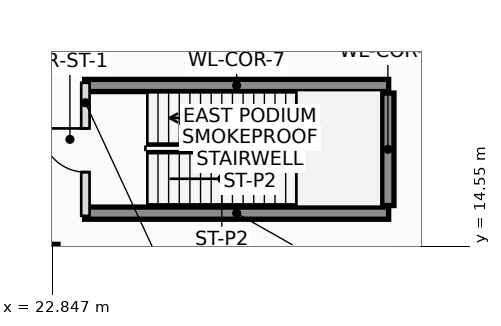
"""IFC4 building model, lengths in metres.
Left out: names, types, materials, properties, quantities, classifications, styles, units other than length and angle.
Written with IfcOpenShell. Run it as: python <this file> out.ifc"""

import sys

from ifc_helpers import new_model, si_unit, direction, frame, frame_2d, origin, origin_2d, place, context, subcontext, project, spatial, rectangle, extrude, source, transform, mapped, element, fill, save


model = new_model("IFC4")
c1 = context("Model", 3, precision=1e-05, world=origin(), true_north=direction((0.0, 1.0)))
c2 = subcontext(c1, "Body", "Model", "MODEL_VIEW")
j1 = project(units=[si_unit("LENGTHUNIT", "METRE"), si_unit("PLANEANGLEUNIT", "RADIAN")], contexts=[c1])
p1 = place(None, origin())
s1 = spatial("IfcSite", under=j1, at=p1, CompositionType="ELEMENT")
p2 = place(p1, origin())
s2 = spatial("IfcBuilding", under=s1, at=p2, CompositionType="ELEMENT")
p3 = place(p2, frame((0.0, 0.0, -9.6)))
s3 = spatial("IfcBuildingStorey", under=s2, at=p3, CompositionType="ELEMENT", Elevation=-9.6)
for number, where, z_axis, x_axis in (
    (1, (23.7, 18.78, 0.0), (0.0, 0.0, 1.0), (1.0, 0.0, 0.0)),
    (2, (23.7, 15.42, 0.0), (0.0, 0.0, 1.0), (1.0, 0.0, 0.0)),
):
    element("IfcWall", number, at=place(p3, frame(where, z_axis=z_axis, x_axis=x_axis)), inside=s3, PredefinedType="SHEAR", context=c2, shape_type="SweptSolid", body=[
        extrude(rectangle(XDim=8.0, YDim=0.32, at=frame_2d((4.0, 0.0))), origin(), (0.0, 0.0, 1.0), 4.8),
    ])
p4 = place(p3, frame((31.68, 15.62, 0.0), z_axis=(0.0, 0.0, 1.0), x_axis=(0.0, 1.0, 0.0)))
e3 = element("IfcWall", 3, at=p4, inside=s3, PredefinedType="SHEAR", context=c2, shape_type="SweptSolid", body=[
    extrude(rectangle(XDim=2.96, YDim=0.32, at=frame_2d((1.48, 0.0))), origin(), (0.0, 0.0, 1.0), 4.8),
])
m1 = source(origin(), c2, "Body", "SweptSolid", [
    extrude(rectangle(XDim=1.2, YDim=1.2, at=origin_2d()), origin(), (0.0, 0.0, 1.0), 4.8),
])
p5 = place(p3, frame((22.4, 14.0, 0.0), z_axis=(0.0, 0.0, 1.0), x_axis=(1.0, 0.0, 0.0)))
e4 = element("IfcColumn", 4, at=p5, inside=s3, PredefinedType="COLUMN", context=c2, shape_type="MappedRepresentation", body=[
    mapped(m1, transform((0.0, 0.0, 0.0), scale=1.0)),
])
p6 = place(p3, frame((23.72, 15.35, 0.0), z_axis=(0.0, 0.0, 1.0), x_axis=(0.0, 1.0, 0.0)))
e5 = element("IfcWall", 5, at=p6, inside=s3, PredefinedType="PLUMBINGWALL", context=c2, shape_type="SweptSolid", body=[
    extrude(rectangle(XDim=3.5, YDim=0.22, at=frame_2d((1.75, 0.0))), origin(), (0.0, 0.0, 1.0), 4.52),
])
p7 = place(p6, frame((1.15, 0.0, 0.0)))
e6 = element("IfcOpeningElement", 6, at=p7, cuts=e5, PredefinedType="OPENING", context=c2, shape_type="SweptSolid", body=[
    extrude(rectangle(XDim=1.15, YDim=2.15, at=frame_2d((0.575, 1.075))), frame((0.0, 0.12, 0.0), z_axis=(0.0, -1.0, 0.0), x_axis=(1.0, 0.0, 0.0)), (0.0, 0.0, 1.0), 0.24),
])
p8 = place(p7, origin())
e7 = element("IfcDoor", 7, at=p8, inside=s3, OperationType="SINGLE_SWING_RIGHT", PredefinedType="DOOR", context=c2, shape_type="SweptSolid", body=[
    extrude(rectangle(XDim=1.15, YDim=2.15, at=frame_2d((0.575, 1.075))), frame((0.0, 0.025, 0.0), z_axis=(0.0, -1.0, 0.0), x_axis=(1.0, 0.0, 0.0)), (0.0, 0.0, 1.0), 0.05),
])
fill(e6, e7)
save(model, sys.argv[1])
